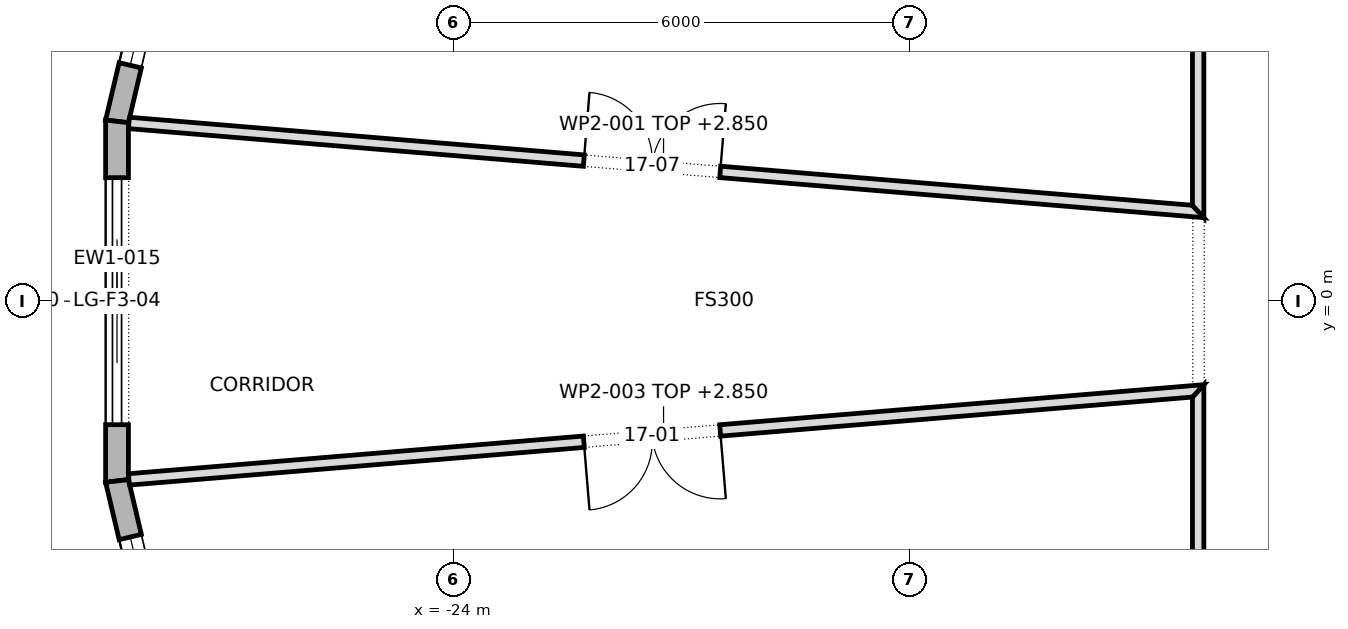
"""IFC4 building model, lengths in metres.
Left out: names, types, materials, properties, quantities, classifications, styles, units other than length and angle.
Written with IfcOpenShell. Run it as: python <this file> out.ifc"""

import sys

from ifc_helpers import new_model, si_unit, direction, frame, frame_2d, origin, place, context, subcontext, project, spatial, polyline, rectangle, outline, extrude, element, fill, save


model = new_model("IFC4")
c1 = context("Model", 3, precision=1e-05, world=origin(), true_north=direction((0.0, 1.0)))
c2 = subcontext(c1, "Body", "Model", "MODEL_VIEW")
j1 = project(units=[si_unit("LENGTHUNIT", "METRE"), si_unit("PLANEANGLEUNIT", "RADIAN")], contexts=[c1])
p1 = place(None, origin())
s1 = spatial("IfcSite", under=j1, at=p1, CompositionType="ELEMENT")
p2 = place(p1, origin())
s2 = spatial("IfcBuilding", under=s1, at=p2, CompositionType="ELEMENT")
p3 = place(p2, frame((0.0, 0.0, 238.9)))
s3 = spatial("IfcBuildingStorey", under=s2, at=p3, CompositionType="ELEMENT", Elevation=238.9)
p4 = place(p3, frame((-27.329, 7.004, 0.0), z_axis=(0.0, 0.0, 1.0), x_axis=(-0.229593205094, -0.973286679337, 0.0)))
e1 = element("IfcWall", 1, at=p4, inside=s3, PredefinedType="STANDARD", context=c2, shape_type="SweptSolid", body=[
    extrude(outline(polyline([(-0.017, -0.15), (4.783, -0.15), (4.748, 0.15), (0.017, 0.15), (-0.017, -0.15)])), origin(), (0.0, 0.0, 1.0), 3.7),
])
p5 = place(p4, frame((0.758, 0.0, 0.6)))
e2 = element("IfcOpeningElement", 2, at=p5, cuts=e1, PredefinedType="OPENING", context=c2, shape_type="SweptSolid", body=[
    extrude(rectangle(XDim=3.25, YDim=2.65, at=frame_2d((1.625, 1.325))), frame((0.0, 0.162, 0.0), z_axis=(0.0, -1.0, 0.0), x_axis=(1.0, 0.0, 0.0)), (0.0, 0.0, 1.0), 0.324),
])
p6 = place(p3, frame((-28.424, 2.365, 0.0), z_axis=(0.0, 0.0, 1.0), x_axis=(0.0, -1.0, 0.0)))
e3 = element("IfcWall", 3, at=p6, inside=s3, PredefinedType="STANDARD", context=c2, shape_type="SweptSolid", body=[
    extrude(outline(polyline([(-0.018, -0.15), (4.748, -0.15), (4.713, 0.15), (0.018, 0.15), (-0.018, -0.15)])), origin(), (0.0, 0.0, 1.0), 3.7),
])
p7 = place(p6, frame((0.74, 0.0, 0.0)))
e4 = element("IfcOpeningElement", 4, at=p7, cuts=e3, PredefinedType="OPENING", context=c2, shape_type="SweptSolid", body=[
    extrude(rectangle(XDim=3.25, YDim=3.25, at=frame_2d((1.625, 1.625))), frame((0.0, 0.162, 0.0), z_axis=(0.0, -1.0, 0.0), x_axis=(1.0, 0.0, 0.0)), (0.0, 0.0, 1.0), 0.324),
])
p8 = place(p3, frame((-28.424, -2.365, 0.0), z_axis=(0.0, 0.0, 1.0), x_axis=(0.229593205094, -0.973286679337, 0.0)))
e5 = element("IfcWall", 5, at=p8, inside=s3, PredefinedType="STANDARD", context=c2, shape_type="SweptSolid", body=[
    extrude(outline(polyline([(-0.018, -0.15), (4.783, -0.15), (4.749, 0.15), (0.018, 0.15), (-0.018, -0.15)])), origin(), (0.0, 0.0, 1.0), 3.7),
])
p9 = place(p8, frame((0.758, 0.0, 0.6)))
e6 = element("IfcOpeningElement", 6, at=p9, cuts=e5, PredefinedType="OPENING", context=c2, shape_type="SweptSolid", body=[
    extrude(rectangle(XDim=3.25, YDim=2.65, at=frame_2d((1.625, 1.325))), frame((0.0, 0.162, 0.0), z_axis=(0.0, -1.0, 0.0), x_axis=(1.0, 0.0, 0.0)), (0.0, 0.0, 1.0), 0.324),
])
p10 = place(p3, frame((-28.267, 2.345, 0.0), z_axis=(0.0, 0.0, 1.0), x_axis=(0.996588676362, -0.082528844332, 0.0)))
e7 = element("IfcWall", 7, at=p10, inside=s3, PredefinedType="PARTITIONING", context=c2, shape_type="SweptSolid", body=[
    extrude(outline(polyline([(14.197, -0.075), (14.197, -0.075), (14.115, 0.0), (14.034, 0.075), (12.28, 0.075), (10.526, 0.075), (8.773, 0.075), (7.019, 0.075), (5.265, 0.075), (3.511, 0.075), (1.758, 0.075), (0.004, 0.075), (0.0, 0.048), (0.0, -0.075), (1.775, -0.075), (3.549, -0.075), (5.324, -0.075), (7.098, -0.075), (8.873, -0.075), (10.647, -0.075), (12.422, -0.075), (14.197, -0.075)])), origin(), (0.0, 0.0, 1.0), 2.85),
])
p11 = place(p10, frame((6.006, 0.0, 0.0)))
e8 = element("IfcOpeningElement", 8, at=p11, cuts=e7, PredefinedType="OPENING", context=c2, shape_type="SweptSolid", body=[
    extrude(rectangle(XDim=1.8, YDim=2.1, at=frame_2d((0.9, 1.05))), frame((0.0, 0.087, 0.0), z_axis=(0.0, -1.0, 0.0), x_axis=(1.0, 0.0, 0.0)), (0.0, 0.0, 1.0), 0.174),
])
p12 = place(p3, frame((-14.2, -14.275, 0.0), z_axis=(0.0, 0.0, 1.0), x_axis=(0.0, 1.0, 0.0)))
e9 = element("IfcWall", 9, at=p12, inside=s3, PredefinedType="PARTITIONING", context=c2, shape_type="SweptSolid", body=[
    extrude(outline(polyline([(0.15, -0.075), (2.011, -0.075), (3.872, -0.075), (5.733, -0.075), (7.594, -0.075), (9.455, -0.075), (11.315, -0.075), (13.176, -0.075), (13.013, 0.075), (11.155, 0.075), (9.295, 0.075), (7.436, 0.075), (5.577, 0.075), (3.718, 0.075), (1.859, 0.075), (0.0, 0.075), (0.15, -0.075)])), origin(), (0.0, 0.0, 1.0), 3.7),
])
p13 = place(p3, frame((-14.119, -1.173, 0.0), z_axis=(0.0, 0.0, 1.0), x_axis=(-0.996588676362, -0.082528844332, 0.0)))
e10 = element("IfcWall", 10, at=p13, inside=s3, PredefinedType="PARTITIONING", context=c2, shape_type="SweptSolid", body=[
    extrude(outline(polyline([(14.197, -0.075), (14.197, 0.048), (14.193, 0.075), (12.439, 0.075), (10.685, 0.075), (8.931, 0.075), (7.178, 0.075), (5.424, 0.075), (3.67, 0.075), (1.917, 0.075), (0.163, 0.075), (0.081, 0.0), (0.0, -0.075), (1.775, -0.075), (3.549, -0.075), (5.324, -0.075), (7.098, -0.075), (8.873, -0.075), (10.647, -0.075), (12.422, -0.075), (14.197, -0.075)])), origin(), (0.0, 0.0, 1.0), 2.85),
])
p14 = place(p13, frame((6.391, 0.0, 0.0)))
e11 = element("IfcOpeningElement", 11, at=p14, cuts=e10, PredefinedType="OPENING", context=c2, shape_type="SweptSolid", body=[
    extrude(rectangle(XDim=1.8, YDim=2.1, at=frame_2d((0.9, 1.05))), frame((0.0, 0.087, 0.0), z_axis=(0.0, -1.0, 0.0), x_axis=(1.0, 0.0, 0.0)), (0.0, 0.0, 1.0), 0.174),
])
p15 = place(p3, frame((-14.2, 1.098, 0.0), z_axis=(0.0, 0.0, 1.0), x_axis=(0.0, 1.0, 0.0)))
e12 = element("IfcWall", 12, at=p15, inside=s3, PredefinedType="PARTITIONING", context=c2, shape_type="SweptSolid", body=[
    extrude(outline(polyline([(0.0, -0.075), (1.861, -0.075), (3.722, -0.075), (5.583, -0.075), (7.444, -0.075), (9.305, -0.075), (11.166, -0.075), (13.027, -0.075), (13.177, 0.075), (11.317, 0.075), (9.458, 0.075), (7.599, 0.075), (5.74, 0.075), (3.881, 0.075), (2.022, 0.075), (0.163, 0.075), (0.0, -0.075)])), origin(), (0.0, 0.0, 1.0), 3.7),
])
p16 = place(p5, origin())
e13 = element("IfcWindow", 13, at=p16, inside=s3, PartitioningType="TRIPLE_PANEL_VERTICAL", PredefinedType="WINDOW", context=c2, shape_type="SweptSolid", body=[
    extrude(rectangle(XDim=3.25, YDim=2.65, at=frame_2d((1.625, 1.325))), frame((0.0, 0.03, 0.0), z_axis=(0.0, -1.0, 0.0), x_axis=(1.0, 0.0, 0.0)), (0.0, 0.0, 1.0), 0.06),
])
fill(e2, e13)
p17 = place(p7, origin())
e14 = element("IfcDoor", 14, at=p17, inside=s3, OperationType="DOUBLE_DOOR_SLIDING", PredefinedType="DOOR", context=c2, shape_type="SweptSolid", body=[
    extrude(rectangle(XDim=3.25, YDim=3.25, at=frame_2d((1.625, 1.625))), frame((0.0, 0.025, 0.0), z_axis=(0.0, -1.0, 0.0), x_axis=(1.0, 0.0, 0.0)), (0.0, 0.0, 1.0), 0.05),
])
fill(e4, e14)
p18 = place(p9, origin())
e15 = element("IfcWindow", 15, at=p18, inside=s3, PartitioningType="TRIPLE_PANEL_VERTICAL", PredefinedType="WINDOW", context=c2, shape_type="SweptSolid", body=[
    extrude(rectangle(XDim=3.25, YDim=2.65, at=frame_2d((1.625, 1.325))), frame((0.0, 0.03, 0.0), z_axis=(0.0, -1.0, 0.0), x_axis=(1.0, 0.0, 0.0)), (0.0, 0.0, 1.0), 0.06),
])
fill(e6, e15)
p19 = place(p14, origin())
e16 = element("IfcDoor", 16, at=p19, inside=s3, OperationType="DOUBLE_DOOR_SINGLE_SWING", PredefinedType="DOOR", context=c2, shape_type="SweptSolid", body=[
    extrude(rectangle(XDim=1.8, YDim=2.1, at=frame_2d((0.9, 1.05))), frame((0.0, 0.025, 0.0), z_axis=(0.0, -1.0, 0.0), x_axis=(1.0, 0.0, 0.0)), (0.0, 0.0, 1.0), 0.05),
])
fill(e11, e16)
p20 = place(p11, origin())
e17 = element("IfcDoor", 17, at=p20, inside=s3, OperationType="DOUBLE_DOOR_SINGLE_SWING", PredefinedType="DOOR", context=c2, shape_type="SweptSolid", body=[
    extrude(rectangle(XDim=1.8, YDim=2.1, at=frame_2d((0.9, 1.05))), frame((0.0, 0.025, 0.0), z_axis=(0.0, -1.0, 0.0), x_axis=(1.0, 0.0, 0.0)), (0.0, 0.0, 1.0), 0.05),
])
fill(e8, e17)
save(model, sys.argv[1])
